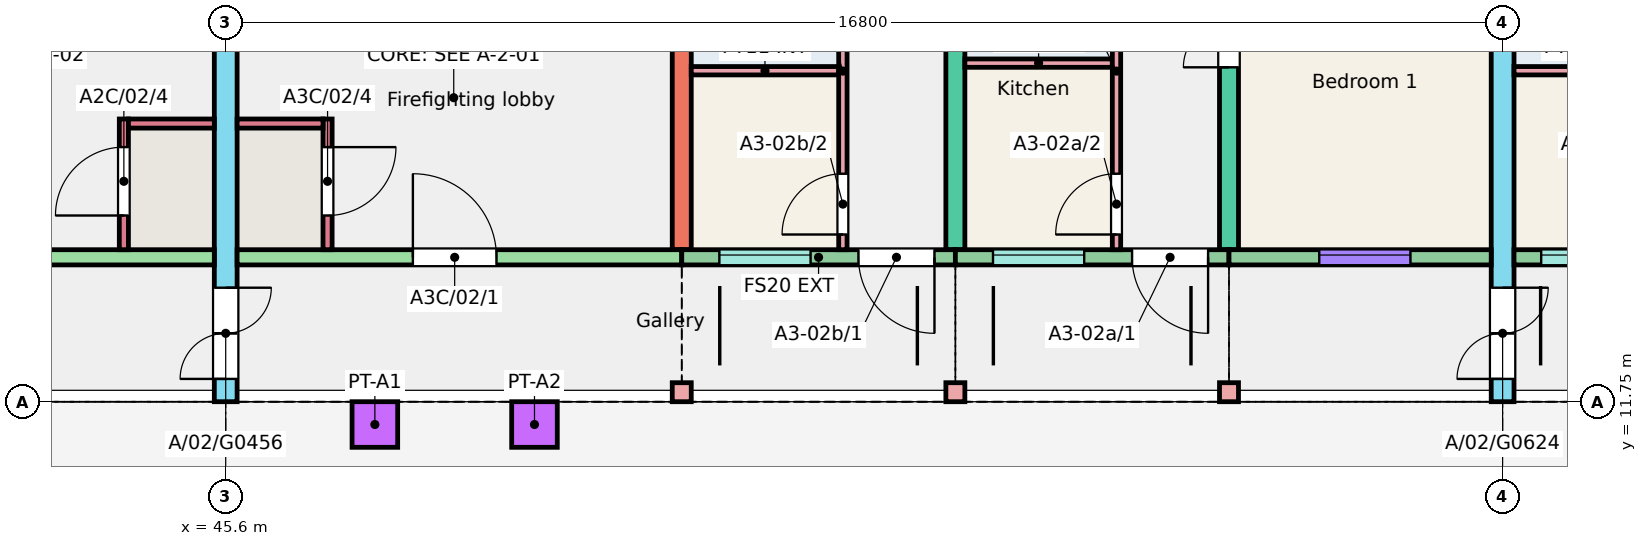
"""IFC4 building model, lengths in metres.
Left out: names, types, materials, properties, quantities, classifications, styles, units other than length and angle.
Written with IfcOpenShell. Run it as: python <this file> out.ifc"""

import sys

from ifc_helpers import new_model, si_unit, direction, frame, frame_2d, origin, origin_2d, place, context, subcontext, project, spatial, rectangle, extrude, element, fill, save


model = new_model("IFC4")
c1 = context("Model", 3, precision=1e-05, world=origin(), true_north=direction((0.0, 1.0)))
c2 = subcontext(c1, "Body", "Model", "MODEL_VIEW")
j1 = project(units=[si_unit("LENGTHUNIT", "METRE"), si_unit("PLANEANGLEUNIT", "RADIAN")], contexts=[c1])
p1 = place(None, origin())
s1 = spatial("IfcSite", under=j1, at=p1, CompositionType="ELEMENT")
p2 = place(p1, origin())
s2 = spatial("IfcBuilding", under=s1, at=p2, CompositionType="ELEMENT")
p3 = place(p2, frame((0.0, 0.0, 6.0)))
s3 = spatial("IfcBuildingStorey", under=s2, at=p3, CompositionType="ELEMENT", Elevation=6.0)
p4 = place(p3, frame((45.6, 11.75, 0.0), z_axis=(0.0, 0.0, 1.0), x_axis=(0.0, 1.0, 0.0)))
e1 = element("IfcWall", 1, at=p4, inside=s3, PredefinedType="SHEAR", context=c2, shape_type="SweptSolid", body=[
    extrude(rectangle(XDim=11.0, YDim=0.3, at=frame_2d((5.5, 0.0))), origin(), (0.0, 0.0, 1.0), 3.0),
])
p5 = place(p4, frame((0.3, 0.0, 0.0)))
e2 = element("IfcOpeningElement", 2, at=p5, cuts=e1, PredefinedType="OPENING", context=c2, shape_type="SweptSolid", body=[
    extrude(rectangle(XDim=1.2, YDim=2.1, at=frame_2d((0.6, 1.05))), frame((0.0, 0.16, 0.0), z_axis=(0.0, -1.0, 0.0), x_axis=(1.0, 0.0, 0.0)), (0.0, 0.0, 1.0), 0.32),
])
for number, where, z_axis, x_axis in (
    (3, (51.6, 13.75, 0.0), (0.0, 0.0, 1.0), (0.0, 1.0, 0.0)),
    (4, (55.2, 13.75, 0.0), (0.0, 0.0, 1.0), (0.0, 1.0, 0.0)),
):
    element("IfcWall", number, at=place(p3, frame(where, z_axis=z_axis, x_axis=x_axis)), inside=s3, PredefinedType="SHEAR", context=c2, shape_type="SweptSolid", body=[
        extrude(rectangle(XDim=9.0, YDim=0.25, at=frame_2d((4.5, 0.0))), origin(), (0.0, 0.0, 1.0), 3.0),
    ])
p6 = place(p3, frame((58.8, 13.75, 0.0), z_axis=(0.0, 0.0, 1.0), x_axis=(0.0, 1.0, 0.0)))
e5 = element("IfcWall", 5, at=p6, inside=s3, PredefinedType="SHEAR", context=c2, shape_type="SweptSolid", body=[
    extrude(rectangle(XDim=9.0, YDim=0.25, at=frame_2d((4.5, 0.0))), origin(), (0.0, 0.0, 1.0), 3.0),
])
p7 = place(p6, frame((2.4, 0.0, 0.0)))
e6 = element("IfcOpeningElement", 6, at=p7, cuts=e5, PredefinedType="OPENING", context=c2, shape_type="SweptSolid", body=[
    extrude(rectangle(XDim=1.2, YDim=2.1, at=frame_2d((0.6, 1.05))), frame((0.0, 0.135, 0.0), z_axis=(0.0, -1.0, 0.0), x_axis=(1.0, 0.0, 0.0)), (0.0, 0.0, 1.0), 0.27),
])
p8 = place(p6, frame((6.4, 0.0, 0.0)))
e7 = element("IfcOpeningElement", 7, at=p8, cuts=e5, PredefinedType="OPENING", context=c2, shape_type="SweptSolid", body=[
    extrude(rectangle(XDim=1.2, YDim=2.1, at=frame_2d((0.6, 1.05))), frame((0.0, 0.135, 0.0), z_axis=(0.0, -1.0, 0.0), x_axis=(1.0, 0.0, 0.0)), (0.0, 0.0, 1.0), 0.27),
])
p9 = place(p3, frame((62.4, 11.75, 0.0), z_axis=(0.0, 0.0, 1.0), x_axis=(0.0, 1.0, 0.0)))
e8 = element("IfcWall", 8, at=p9, inside=s3, PredefinedType="SHEAR", context=c2, shape_type="SweptSolid", body=[
    extrude(rectangle(XDim=11.0, YDim=0.3, at=frame_2d((5.5, 0.0))), origin(), (0.0, 0.0, 1.0), 3.0),
])
p10 = place(p9, frame((0.3, 0.0, 0.0)))
e9 = element("IfcOpeningElement", 9, at=p10, cuts=e8, PredefinedType="OPENING", context=c2, shape_type="SweptSolid", body=[
    extrude(rectangle(XDim=1.2, YDim=2.1, at=frame_2d((0.6, 1.05))), frame((0.0, 0.16, 0.0), z_axis=(0.0, -1.0, 0.0), x_axis=(1.0, 0.0, 0.0)), (0.0, 0.0, 1.0), 0.32),
])
p11 = place(p3, frame((39.6, 13.65, 0.0), z_axis=(0.0, 0.0, 1.0), x_axis=(1.0, 0.0, 0.0)))
e10 = element("IfcWall", 10, at=p11, inside=s3, PredefinedType="SHEAR", context=c2, shape_type="SweptSolid", body=[
    extrude(rectangle(XDim=5.85, YDim=0.2, at=frame_2d((2.925, 0.0))), origin(), (0.0, 0.0, 1.0), 3.0),
])
p12 = place(p11, frame((2.438, 0.0, 0.0)))
e11 = element("IfcOpeningElement", 11, at=p12, cuts=e10, PredefinedType="OPENING", context=c2, shape_type="SweptSolid", body=[
    extrude(rectangle(XDim=1.1, YDim=2.1, at=frame_2d((0.55, 1.05))), frame((0.0, 0.11, 0.0), z_axis=(0.0, -1.0, 0.0), x_axis=(1.0, 0.0, 0.0)), (0.0, 0.0, 1.0), 0.22),
])
p13 = place(p3, frame((44.26, 13.75, 0.0), z_axis=(0.0, 0.0, 1.0), x_axis=(0.0, 1.0, 0.0)))
e12 = element("IfcWall", 12, at=p13, inside=s3, PredefinedType="SHEAR", context=c2, shape_type="SweptSolid", body=[
    extrude(rectangle(XDim=1.72, YDim=0.12, at=frame_2d((0.86, 0.0))), origin(), (0.0, 0.0, 1.0), 3.0),
])
p14 = place(p13, frame((0.45, 0.0, 0.0)))
e13 = element("IfcOpeningElement", 13, at=p14, cuts=e12, PredefinedType="OPENING", context=c2, shape_type="SweptSolid", body=[
    extrude(rectangle(XDim=0.9, YDim=2.1, at=frame_2d((0.45, 1.05))), frame((0.0, 0.07, 0.0), z_axis=(0.0, -1.0, 0.0), x_axis=(1.0, 0.0, 0.0)), (0.0, 0.0, 1.0), 0.14),
])
p15 = place(p3, frame((44.32, 15.41, 0.0), z_axis=(0.0, 0.0, 1.0), x_axis=(1.0, 0.0, 0.0)))
e14 = element("IfcWall", 14, at=p15, inside=s3, PredefinedType="SHEAR", context=c2, shape_type="SweptSolid", body=[
    extrude(rectangle(XDim=1.13, YDim=0.12, at=frame_2d((0.565, 0.0))), origin(), (0.0, 0.0, 1.0), 3.0),
])
p16 = place(p3, frame((45.75, 13.65, 0.0), z_axis=(0.0, 0.0, 1.0), x_axis=(1.0, 0.0, 0.0)))
e15 = element("IfcWall", 15, at=p16, inside=s3, PredefinedType="SHEAR", context=c2, shape_type="SweptSolid", body=[
    extrude(rectangle(XDim=5.85, YDim=0.2, at=frame_2d((2.925, 0.0))), origin(), (0.0, 0.0, 1.0), 3.0),
])
p17 = place(p16, frame((2.312, 0.0, 0.0)))
e16 = element("IfcOpeningElement", 16, at=p17, cuts=e15, PredefinedType="OPENING", context=c2, shape_type="SweptSolid", body=[
    extrude(rectangle(XDim=1.1, YDim=2.1, at=frame_2d((0.55, 1.05))), frame((0.0, 0.11, 0.0), z_axis=(0.0, -1.0, 0.0), x_axis=(1.0, 0.0, 0.0)), (0.0, 0.0, 1.0), 0.22),
])
p18 = place(p3, frame((46.94, 13.75, 0.0), z_axis=(0.0, 0.0, 1.0), x_axis=(0.0, 1.0, 0.0)))
e17 = element("IfcWall", 17, at=p18, inside=s3, PredefinedType="SHEAR", context=c2, shape_type="SweptSolid", body=[
    extrude(rectangle(XDim=1.72, YDim=0.12, at=frame_2d((0.86, 0.0))), origin(), (0.0, 0.0, 1.0), 3.0),
])
p19 = place(p18, frame((0.45, 0.0, 0.0)))
e18 = element("IfcOpeningElement", 18, at=p19, cuts=e17, PredefinedType="OPENING", context=c2, shape_type="SweptSolid", body=[
    extrude(rectangle(XDim=0.9, YDim=2.1, at=frame_2d((0.45, 1.05))), frame((0.0, 0.07, 0.0), z_axis=(0.0, -1.0, 0.0), x_axis=(1.0, 0.0, 0.0)), (0.0, 0.0, 1.0), 0.14),
])
p20 = place(p3, frame((45.75, 15.41, 0.0), z_axis=(0.0, 0.0, 1.0), x_axis=(1.0, 0.0, 0.0)))
e19 = element("IfcWall", 19, at=p20, inside=s3, PredefinedType="SHEAR", context=c2, shape_type="SweptSolid", body=[
    extrude(rectangle(XDim=1.13, YDim=0.12, at=frame_2d((0.565, 0.0))), origin(), (0.0, 0.0, 1.0), 3.0),
])
p21 = place(p3, frame((51.6, 13.65, 0.0), z_axis=(0.0, 0.0, 1.0), x_axis=(1.0, 0.0, 0.0)))
e20 = element("IfcWall", 20, at=p21, inside=s3, PredefinedType="SOLIDWALL", context=c2, shape_type="SweptSolid", body=[
    extrude(rectangle(XDim=3.6, YDim=0.2, at=frame_2d((1.8, 0.0))), origin(), (0.0, 0.0, 1.0), 3.0),
])
p22 = place(p21, frame((0.495, 0.0, 1.1)))
e21 = element("IfcOpeningElement", 21, at=p22, cuts=e20, PredefinedType="OPENING", context=c2, shape_type="SweptSolid", body=[
    extrude(rectangle(XDim=1.2, YDim=1.3, at=frame_2d((0.6, 0.65))), frame((0.0, 0.11, 0.0), z_axis=(0.0, -1.0, 0.0), x_axis=(1.0, 0.0, 0.0)), (0.0, 0.0, 1.0), 0.22),
])
p23 = place(p21, frame((2.325, 0.0, 0.0)))
e22 = element("IfcOpeningElement", 22, at=p23, cuts=e20, PredefinedType="OPENING", context=c2, shape_type="SweptSolid", body=[
    extrude(rectangle(XDim=1.0, YDim=2.1, at=frame_2d((0.5, 1.05))), frame((0.0, 0.11, 0.0), z_axis=(0.0, -1.0, 0.0), x_axis=(1.0, 0.0, 0.0)), (0.0, 0.0, 1.0), 0.22),
])
p24 = place(p3, frame((55.2, 13.65, 0.0), z_axis=(0.0, 0.0, 1.0), x_axis=(1.0, 0.0, 0.0)))
e23 = element("IfcWall", 23, at=p24, inside=s3, PredefinedType="SOLIDWALL", context=c2, shape_type="SweptSolid", body=[
    extrude(rectangle(XDim=3.6, YDim=0.2, at=frame_2d((1.8, 0.0))), origin(), (0.0, 0.0, 1.0), 3.0),
])
p25 = place(p24, frame((0.495, 0.0, 1.1)))
e24 = element("IfcOpeningElement", 24, at=p25, cuts=e23, PredefinedType="OPENING", context=c2, shape_type="SweptSolid", body=[
    extrude(rectangle(XDim=1.2, YDim=1.3, at=frame_2d((0.6, 0.65))), frame((0.0, 0.11, 0.0), z_axis=(0.0, -1.0, 0.0), x_axis=(1.0, 0.0, 0.0)), (0.0, 0.0, 1.0), 0.22),
])
p26 = place(p24, frame((2.325, 0.0, 0.0)))
e25 = element("IfcOpeningElement", 25, at=p26, cuts=e23, PredefinedType="OPENING", context=c2, shape_type="SweptSolid", body=[
    extrude(rectangle(XDim=1.0, YDim=2.1, at=frame_2d((0.5, 1.05))), frame((0.0, 0.11, 0.0), z_axis=(0.0, -1.0, 0.0), x_axis=(1.0, 0.0, 0.0)), (0.0, 0.0, 1.0), 0.22),
])
p27 = place(p3, frame((58.8, 13.65, 0.0), z_axis=(0.0, 0.0, 1.0), x_axis=(1.0, 0.0, 0.0)))
e26 = element("IfcWall", 26, at=p27, inside=s3, PredefinedType="SOLIDWALL", context=c2, shape_type="SweptSolid", body=[
    extrude(rectangle(XDim=3.45, YDim=0.2, at=frame_2d((1.725, 0.0))), origin(), (0.0, 0.0, 1.0), 3.0),
])
p28 = place(p27, frame((1.188, 0.0, 0.8)))
e27 = element("IfcOpeningElement", 27, at=p28, cuts=e26, PredefinedType="OPENING", context=c2, shape_type="SweptSolid", body=[
    extrude(rectangle(XDim=1.2, YDim=1.6, at=frame_2d((0.6, 0.8))), frame((0.0, 0.11, 0.0), z_axis=(0.0, -1.0, 0.0), x_axis=(1.0, 0.0, 0.0)), (0.0, 0.0, 1.0), 0.22),
])
p29 = place(p3, frame((62.55, 13.65, 0.0), z_axis=(0.0, 0.0, 1.0), x_axis=(1.0, 0.0, 0.0)))
e28 = element("IfcWall", 28, at=p29, inside=s3, PredefinedType="SOLIDWALL", context=c2, shape_type="SweptSolid", body=[
    extrude(rectangle(XDim=3.45, YDim=0.2, at=frame_2d((1.725, 0.0))), origin(), (0.0, 0.0, 1.0), 3.0),
])
p30 = place(p29, frame((0.357, 0.0, 1.1)))
e29 = element("IfcOpeningElement", 29, at=p30, cuts=e28, PredefinedType="OPENING", context=c2, shape_type="SweptSolid", body=[
    extrude(rectangle(XDim=1.2, YDim=1.3, at=frame_2d((0.6, 0.65))), frame((0.0, 0.11, 0.0), z_axis=(0.0, -1.0, 0.0), x_axis=(1.0, 0.0, 0.0)), (0.0, 0.0, 1.0), 0.22),
])
p31 = place(p29, frame((2.175, 0.0, 0.0)))
e30 = element("IfcOpeningElement", 30, at=p31, cuts=e28, PredefinedType="OPENING", context=c2, shape_type="SweptSolid", body=[
    extrude(rectangle(XDim=1.0, YDim=2.1, at=frame_2d((0.5, 1.05))), frame((0.0, 0.11, 0.0), z_axis=(0.0, -1.0, 0.0), x_axis=(1.0, 0.0, 0.0)), (0.0, 0.0, 1.0), 0.22),
])
for number, where, z_axis, x_axis in (
    (31, (51.6, 11.875, 0.0), (0.0, 0.0, 1.0), (1.0, 0.0, 0.0)),
    (32, (55.2, 11.875, 0.0), (0.0, 0.0, 1.0), (1.0, 0.0, 0.0)),
    (33, (58.8, 11.875, 0.0), (0.0, 0.0, 1.0), (1.0, 0.0, 0.0)),
):
    element("IfcColumn", number, at=place(p3, frame(where, z_axis=z_axis, x_axis=x_axis)), inside=s3, PredefinedType="COLUMN", context=c2, shape_type="SweptSolid", body=[
        extrude(rectangle(XDim=0.25, YDim=0.25, at=origin_2d()), origin(), (0.0, 0.0, 1.0), 3.0),
    ])
for number, where, z_axis, x_axis in (
    (34, (47.562, 11.45, 0.3), (0.0, 0.0, 1.0), (1.0, 0.0, 0.0)),
    (35, (49.663, 11.45, 0.3), (0.0, 0.0, 1.0), (1.0, 0.0, 0.0)),
):
    element("IfcColumn", number, at=place(p3, frame(where, z_axis=z_axis, x_axis=x_axis)), inside=s3, PredefinedType="COLUMN", context=c2, shape_type="SweptSolid", body=[
        extrude(rectangle(XDim=0.6, YDim=0.6, at=origin_2d()), origin(), (0.0, 0.0, 1.0), 2.6),
    ])
p32 = place(p3, frame((55.325, 16.205, 0.0), z_axis=(0.0, 0.0, 1.0), x_axis=(1.0, 0.0, 0.0)))
e36 = element("IfcWall", 36, at=p32, inside=s3, PredefinedType="PARTITIONING", context=c2, shape_type="SweptSolid", body=[
    extrude(rectangle(XDim=1.94, YDim=0.11, at=frame_2d((0.97, 0.0))), origin(), (0.0, 0.0, 1.0), 2.8),
])
p33 = place(p3, frame((57.32, 13.75, 0.0), z_axis=(0.0, 0.0, 1.0), x_axis=(0.0, 1.0, 0.0)))
e37 = element("IfcWall", 37, at=p33, inside=s3, PredefinedType="PARTITIONING", context=c2, shape_type="SweptSolid", body=[
    extrude(rectangle(XDim=4.7, YDim=0.11, at=frame_2d((2.35, 0.0))), origin(), (0.0, 0.0, 1.0), 2.8),
])
p34 = place(p33, frame((0.2, 0.0, 0.0)))
e38 = element("IfcOpeningElement", 38, at=p34, cuts=e37, PredefinedType="OPENING", context=c2, shape_type="SweptSolid", body=[
    extrude(rectangle(XDim=0.8, YDim=2.1, at=frame_2d((0.4, 1.05))), frame((0.0, 0.065, 0.0), z_axis=(0.0, -1.0, 0.0), x_axis=(1.0, 0.0, 0.0)), (0.0, 0.0, 1.0), 0.13),
])
p35 = place(p33, frame((3.75, 0.0, 0.0)))
e39 = element("IfcOpeningElement", 39, at=p35, cuts=e37, PredefinedType="OPENING", context=c2, shape_type="SweptSolid", body=[
    extrude(rectangle(XDim=0.8, YDim=2.1, at=frame_2d((0.4, 1.05))), frame((0.0, 0.065, 0.0), z_axis=(0.0, -1.0, 0.0), x_axis=(1.0, 0.0, 0.0)), (0.0, 0.0, 1.0), 0.13),
])
p36 = place(p3, frame((51.725, 16.105, 0.0), z_axis=(0.0, 0.0, 1.0), x_axis=(1.0, 0.0, 0.0)))
e40 = element("IfcWall", 40, at=p36, inside=s3, PredefinedType="PARTITIONING", context=c2, shape_type="SweptSolid", body=[
    extrude(rectangle(XDim=1.94, YDim=0.11, at=frame_2d((0.97, 0.0))), origin(), (0.0, 0.0, 1.0), 2.8),
])
p37 = place(p3, frame((53.72, 13.75, 0.0), z_axis=(0.0, 0.0, 1.0), x_axis=(0.0, 1.0, 0.0)))
e41 = element("IfcWall", 41, at=p37, inside=s3, PredefinedType="PARTITIONING", context=c2, shape_type="SweptSolid", body=[
    extrude(rectangle(XDim=4.7, YDim=0.11, at=frame_2d((2.35, 0.0))), origin(), (0.0, 0.0, 1.0), 2.8),
])
p38 = place(p37, frame((0.2, 0.0, 0.0)))
e42 = element("IfcOpeningElement", 42, at=p38, cuts=e41, PredefinedType="OPENING", context=c2, shape_type="SweptSolid", body=[
    extrude(rectangle(XDim=0.8, YDim=2.1, at=frame_2d((0.4, 1.05))), frame((0.0, 0.065, 0.0), z_axis=(0.0, -1.0, 0.0), x_axis=(1.0, 0.0, 0.0)), (0.0, 0.0, 1.0), 0.13),
])
p39 = place(p37, frame((3.75, 0.0, 0.0)))
e43 = element("IfcOpeningElement", 43, at=p39, cuts=e41, PredefinedType="OPENING", context=c2, shape_type="SweptSolid", body=[
    extrude(rectangle(XDim=0.8, YDim=2.1, at=frame_2d((0.4, 1.05))), frame((0.0, 0.065, 0.0), z_axis=(0.0, -1.0, 0.0), x_axis=(1.0, 0.0, 0.0)), (0.0, 0.0, 1.0), 0.13),
])
p40 = place(p3, frame((62.55, 16.105, 0.0), z_axis=(0.0, 0.0, 1.0), x_axis=(1.0, 0.0, 0.0)))
e44 = element("IfcWall", 44, at=p40, inside=s3, PredefinedType="PARTITIONING", context=c2, shape_type="SweptSolid", body=[
    extrude(rectangle(XDim=1.915, YDim=0.11, at=frame_2d((0.958, 0.0))), origin(), (0.0, 0.0, 1.0), 2.8),
])
p41 = place(p28, origin())
e45 = element("IfcWindow", 45, at=p41, inside=s3, PartitioningType="SINGLE_PANEL", PredefinedType="WINDOW", context=c2, shape_type="SweptSolid", body=[
    extrude(rectangle(XDim=1.2, YDim=1.6, at=frame_2d((0.6, 0.8))), frame((0.0, 0.06, 0.0), z_axis=(0.0, -1.0, 0.0), x_axis=(1.0, 0.0, 0.0)), (0.0, 0.0, 1.0), 0.06),
])
fill(e27, e45)
p42 = place(p25, origin())
e46 = element("IfcWindow", 46, at=p42, inside=s3, PartitioningType="SINGLE_PANEL", PredefinedType="WINDOW", context=c2, shape_type="SweptSolid", body=[
    extrude(rectangle(XDim=1.2, YDim=1.3, at=frame_2d((0.6, 0.65))), frame((0.0, 0.06, 0.0), z_axis=(0.0, -1.0, 0.0), x_axis=(1.0, 0.0, 0.0)), (0.0, 0.0, 1.0), 0.06),
])
fill(e24, e46)
p43 = place(p22, origin())
e47 = element("IfcWindow", 47, at=p43, inside=s3, PartitioningType="SINGLE_PANEL", PredefinedType="WINDOW", context=c2, shape_type="SweptSolid", body=[
    extrude(rectangle(XDim=1.2, YDim=1.3, at=frame_2d((0.6, 0.65))), frame((0.0, 0.06, 0.0), z_axis=(0.0, -1.0, 0.0), x_axis=(1.0, 0.0, 0.0)), (0.0, 0.0, 1.0), 0.06),
])
fill(e21, e47)
p44 = place(p30, origin())
e48 = element("IfcWindow", 48, at=p44, inside=s3, PartitioningType="SINGLE_PANEL", PredefinedType="WINDOW", context=c2, shape_type="SweptSolid", body=[
    extrude(rectangle(XDim=1.2, YDim=1.3, at=frame_2d((0.6, 0.65))), frame((0.0, 0.06, 0.0), z_axis=(0.0, -1.0, 0.0), x_axis=(1.0, 0.0, 0.0)), (0.0, 0.0, 1.0), 0.06),
])
fill(e29, e48)
p45 = place(p26, origin())
e49 = element("IfcDoor", 49, at=p45, inside=s3, OperationType="SINGLE_SWING_RIGHT", PredefinedType="DOOR", context=c2, shape_type="SweptSolid", body=[
    extrude(rectangle(XDim=1.0, YDim=2.1, at=frame_2d((0.5, 1.05))), frame((0.0, 0.025, 0.0), z_axis=(0.0, -1.0, 0.0), x_axis=(1.0, 0.0, 0.0)), (0.0, 0.0, 1.0), 0.05),
])
fill(e25, e49)
p46 = place(p34, origin())
e50 = element("IfcDoor", 50, at=p46, inside=s3, OperationType="SINGLE_SWING_LEFT", PredefinedType="DOOR", context=c2, shape_type="SweptSolid", body=[
    extrude(rectangle(XDim=0.8, YDim=2.1, at=frame_2d((0.4, 1.05))), frame((0.0, 0.025, 0.0), z_axis=(0.0, -1.0, 0.0), x_axis=(1.0, 0.0, 0.0)), (0.0, 0.0, 1.0), 0.05),
])
fill(e38, e50)
p47 = place(p7, origin())
e51 = element("IfcDoor", 51, at=p47, inside=s3, OperationType="DOUBLE_DOOR_SINGLE_SWING", PredefinedType="DOOR", context=c2, shape_type="SweptSolid", body=[
    extrude(rectangle(XDim=1.2, YDim=2.1, at=frame_2d((0.6, 1.05))), frame((0.0, 0.025, 0.0), z_axis=(0.0, -1.0, 0.0), x_axis=(1.0, 0.0, 0.0)), (0.0, 0.0, 1.0), 0.05),
])
fill(e6, e51)
p48 = place(p23, origin())
e52 = element("IfcDoor", 52, at=p48, inside=s3, OperationType="SINGLE_SWING_RIGHT", PredefinedType="DOOR", context=c2, shape_type="SweptSolid", body=[
    extrude(rectangle(XDim=1.0, YDim=2.1, at=frame_2d((0.5, 1.05))), frame((0.0, 0.025, 0.0), z_axis=(0.0, -1.0, 0.0), x_axis=(1.0, 0.0, 0.0)), (0.0, 0.0, 1.0), 0.05),
])
fill(e22, e52)
p49 = place(p38, origin())
e53 = element("IfcDoor", 53, at=p49, inside=s3, OperationType="SINGLE_SWING_LEFT", PredefinedType="DOOR", context=c2, shape_type="SweptSolid", body=[
    extrude(rectangle(XDim=0.8, YDim=2.1, at=frame_2d((0.4, 1.05))), frame((0.0, 0.025, 0.0), z_axis=(0.0, -1.0, 0.0), x_axis=(1.0, 0.0, 0.0)), (0.0, 0.0, 1.0), 0.05),
])
fill(e42, e53)
p50 = place(p14, origin())
e54 = element("IfcDoor", 54, at=p50, inside=s3, OperationType="SINGLE_SWING_LEFT", PredefinedType="DOOR", context=c2, shape_type="SweptSolid", body=[
    extrude(rectangle(XDim=0.9, YDim=2.1, at=frame_2d((0.45, 1.05))), frame((0.0, 0.025, 0.0), z_axis=(0.0, -1.0, 0.0), x_axis=(1.0, 0.0, 0.0)), (0.0, 0.0, 1.0), 0.05),
])
fill(e13, e54)
p51 = place(p17, origin())
e55 = element("IfcDoor", 55, at=p51, inside=s3, OperationType="SINGLE_SWING_LEFT", PredefinedType="DOOR", context=c2, shape_type="SweptSolid", body=[
    extrude(rectangle(XDim=1.1, YDim=2.1, at=frame_2d((0.55, 1.05))), frame((0.0, 0.025, 0.0), z_axis=(0.0, -1.0, 0.0), x_axis=(1.0, 0.0, 0.0)), (0.0, 0.0, 1.0), 0.05),
])
fill(e16, e55)
p52 = place(p19, origin())
e56 = element("IfcDoor", 56, at=p52, inside=s3, OperationType="SINGLE_SWING_RIGHT", PredefinedType="DOOR", context=c2, shape_type="SweptSolid", body=[
    extrude(rectangle(XDim=0.9, YDim=2.1, at=frame_2d((0.45, 1.05))), frame((0.0, 0.025, 0.0), z_axis=(0.0, -1.0, 0.0), x_axis=(1.0, 0.0, 0.0)), (0.0, 0.0, 1.0), 0.05),
])
fill(e18, e56)
p53 = place(p5, origin())
e57 = element("IfcDoor", 57, at=p53, inside=s3, OperationType="DOUBLE_DOOR_SINGLE_SWING", PredefinedType="DOOR", context=c2, shape_type="SweptSolid", body=[
    extrude(rectangle(XDim=1.2, YDim=2.1, at=frame_2d((0.6, 1.05))), frame((0.0, 0.025, 0.0), z_axis=(0.0, -1.0, 0.0), x_axis=(1.0, 0.0, 0.0)), (0.0, 0.0, 1.0), 0.05),
])
fill(e2, e57)
p54 = place(p10, origin())
e58 = element("IfcDoor", 58, at=p54, inside=s3, OperationType="DOUBLE_DOOR_SINGLE_SWING", PredefinedType="DOOR", context=c2, shape_type="SweptSolid", body=[
    extrude(rectangle(XDim=1.2, YDim=2.1, at=frame_2d((0.6, 1.05))), frame((0.0, 0.025, 0.0), z_axis=(0.0, -1.0, 0.0), x_axis=(1.0, 0.0, 0.0)), (0.0, 0.0, 1.0), 0.05),
])
fill(e9, e58)
save(model, sys.argv[1])
